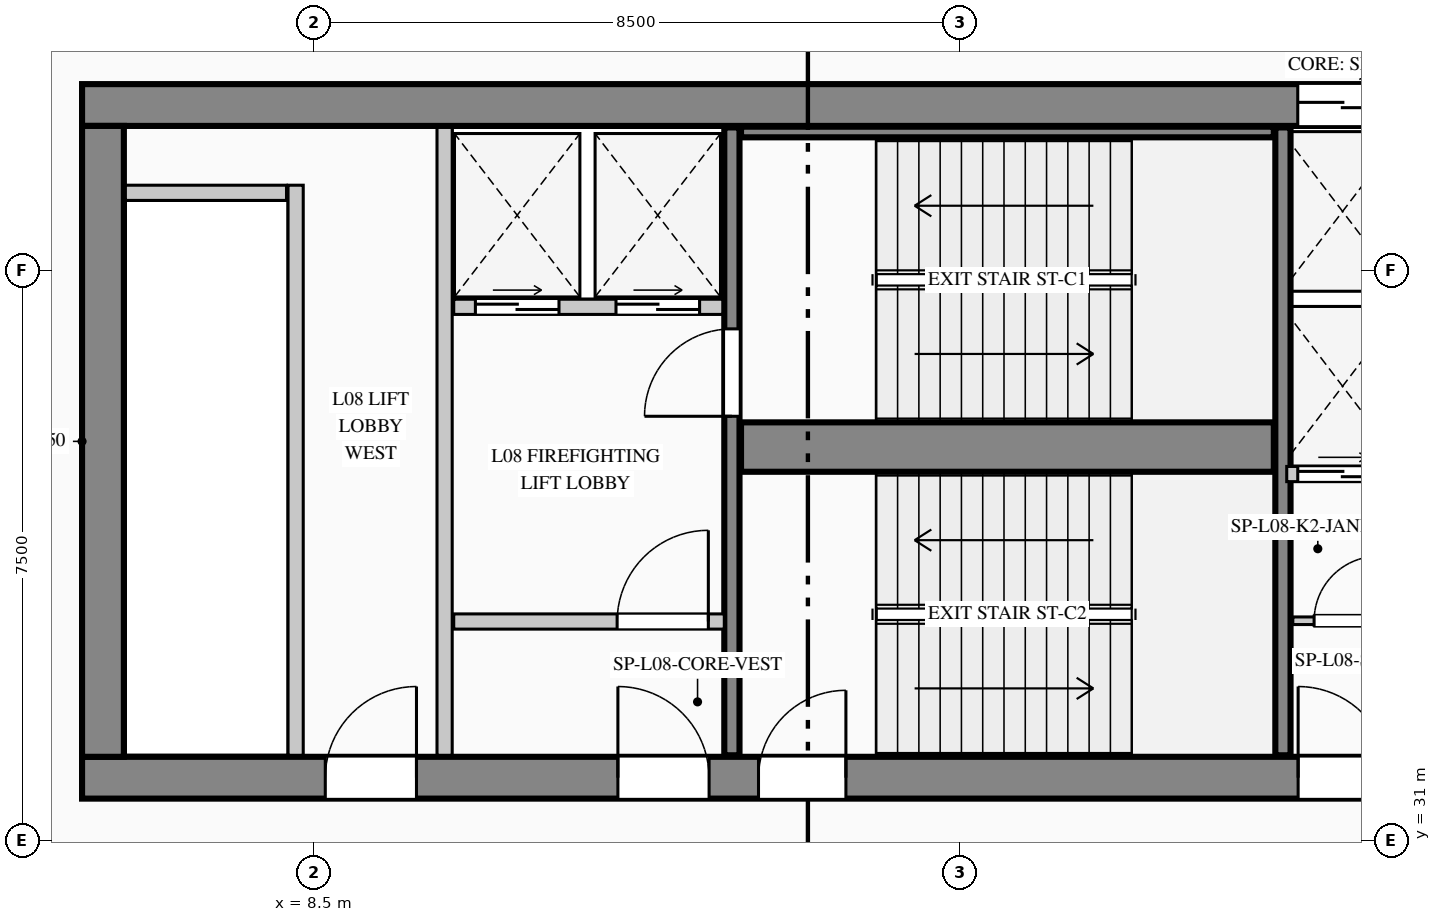
"""IFC4 building model, lengths in metres.
Left out: names, types, materials, properties, quantities, classifications, styles, units other than length and angle.
Written with IfcOpenShell. Run it as: python <this file> out.ifc"""

import sys

from ifc_helpers import new_model, si_unit, direction, frame, frame_2d, origin, place, context, subcontext, project, spatial, rectangle, extrude, element, fill, save


model = new_model("IFC4")
c1 = context("Model", 3, precision=1e-05, world=origin(), true_north=direction((0.0, 1.0)))
c2 = subcontext(c1, "Body", "Model", "MODEL_VIEW")
j1 = project(units=[si_unit("LENGTHUNIT", "METRE"), si_unit("PLANEANGLEUNIT", "RADIAN")], contexts=[c1])
p1 = place(None, origin())
s1 = spatial("IfcSite", under=j1, at=p1, CompositionType="ELEMENT")
p2 = place(p1, origin())
s2 = spatial("IfcBuilding", under=s1, at=p2, CompositionType="ELEMENT")
p3 = place(p2, frame((0.0, 0.0, 35.8)))
s3 = spatial("IfcBuildingStorey", under=s2, at=p3, CompositionType="ELEMENT", Elevation=35.8)
p4 = place(p3, frame((5.45, 40.675, 0.0), z_axis=(0.0, 0.0, 1.0), x_axis=(1.0, 0.0, 0.0)))
e1 = element("IfcWall", 1, at=p4, inside=s3, PredefinedType="SHEAR", context=c2, shape_type="SweptSolid", body=[
    extrude(rectangle(XDim=17.95, YDim=0.55, at=frame_2d((8.975, 0.0))), origin(), (0.0, 0.0, 1.0), 4.4),
])
p5 = place(p4, frame((15.995, 0.0, 0.0)))
e2 = element("IfcOpeningElement", 2, at=p5, cuts=e1, PredefinedType="OPENING", context=c2, shape_type="SweptSolid", body=[
    extrude(rectangle(XDim=1.18, YDim=2.25, at=frame_2d((0.59, 1.125))), frame((0.0, 0.285, 0.0), z_axis=(0.0, -1.0, 0.0), x_axis=(1.0, 0.0, 0.0)), (0.0, 0.0, 1.0), 0.57),
])
p6 = place(p3, frame((5.45, 31.825, 0.0), z_axis=(0.0, 0.0, 1.0), x_axis=(1.0, 0.0, 0.0)))
e3 = element("IfcWall", 3, at=p6, inside=s3, PredefinedType="SHEAR", context=c2, shape_type="SweptSolid", body=[
    extrude(rectangle(XDim=17.95, YDim=0.55, at=frame_2d((8.975, 0.0))), origin(), (0.0, 0.0, 1.0), 4.4),
])
p7 = place(p6, frame((3.2, 0.0, 0.0)))
e4 = element("IfcOpeningElement", 4, at=p7, cuts=e3, PredefinedType="OPENING", context=c2, shape_type="SweptSolid", body=[
    extrude(rectangle(XDim=1.2, YDim=2.2, at=frame_2d((0.6, 1.1))), frame((0.0, 0.285, 0.0), z_axis=(0.0, -1.0, 0.0), x_axis=(1.0, 0.0, 0.0)), (0.0, 0.0, 1.0), 0.57),
])
p8 = place(p6, frame((7.05, 0.0, 0.0)))
e5 = element("IfcOpeningElement", 5, at=p8, cuts=e3, PredefinedType="OPENING", context=c2, shape_type="SweptSolid", body=[
    extrude(rectangle(XDim=1.2, YDim=2.2, at=frame_2d((0.6, 1.1))), frame((0.0, 0.285, 0.0), z_axis=(0.0, -1.0, 0.0), x_axis=(1.0, 0.0, 0.0)), (0.0, 0.0, 1.0), 0.57),
])
p9 = place(p6, frame((8.9, 0.0, 0.0)))
e6 = element("IfcOpeningElement", 6, at=p9, cuts=e3, PredefinedType="OPENING", context=c2, shape_type="SweptSolid", body=[
    extrude(rectangle(XDim=1.15, YDim=2.2, at=frame_2d((0.575, 1.1))), frame((0.0, 0.285, 0.0), z_axis=(0.0, -1.0, 0.0), x_axis=(1.0, 0.0, 0.0)), (0.0, 0.0, 1.0), 0.57),
])
p10 = place(p6, frame((16.0, 0.0, 0.0)))
e7 = element("IfcOpeningElement", 7, at=p10, cuts=e3, PredefinedType="OPENING", context=c2, shape_type="SweptSolid", body=[
    extrude(rectangle(XDim=1.2, YDim=2.2, at=frame_2d((0.6, 1.1))), frame((0.0, 0.285, 0.0), z_axis=(0.0, -1.0, 0.0), x_axis=(1.0, 0.0, 0.0)), (0.0, 0.0, 1.0), 0.57),
])
p11 = place(p3, frame((5.725, 32.1, 0.0), z_axis=(0.0, 0.0, 1.0), x_axis=(0.0, 1.0, 0.0)))
e8 = element("IfcWall", 8, at=p11, inside=s3, PredefinedType="SHEAR", context=c2, shape_type="SweptSolid", body=[
    extrude(rectangle(XDim=8.3, YDim=0.55, at=frame_2d((4.15, 0.0))), origin(), (0.0, 0.0, 1.0), 4.4),
])
p12 = place(p3, frame((14.0, 32.12, 0.0), z_axis=(0.0, 0.0, 1.0), x_axis=(0.0, 1.0, 0.0)))
e9 = element("IfcWall", 9, at=p12, inside=s3, PredefinedType="SHEAR", context=c2, shape_type="SweptSolid", body=[
    extrude(rectangle(XDim=8.26, YDim=0.2, at=frame_2d((4.13, 0.0))), origin(), (0.0, 0.0, 1.0), 4.4),
])
p13 = place(p12, frame((4.46, 0.0, 0.0)))
e10 = element("IfcOpeningElement", 10, at=p13, cuts=e9, PredefinedType="OPENING", context=c2, shape_type="SweptSolid", body=[
    extrude(rectangle(XDim=1.15, YDim=2.2, at=frame_2d((0.575, 1.1))), frame((0.0, 0.11, 0.0), z_axis=(0.0, -1.0, 0.0), x_axis=(1.0, 0.0, 0.0)), (0.0, 0.0, 1.0), 0.22),
])
p14 = place(p3, frame((14.12, 36.175, 0.0), z_axis=(0.0, 0.0, 1.0), x_axis=(1.0, 0.0, 0.0)))
e11 = element("IfcWall", 11, at=p14, inside=s3, PredefinedType="SHEAR", context=c2, shape_type="SweptSolid", body=[
    extrude(rectangle(XDim=7.01, YDim=0.65, at=frame_2d((3.505, 0.0))), origin(), (0.0, 0.0, 1.0), 4.4),
])
p15 = place(p3, frame((21.25, 32.12, 0.0), z_axis=(0.0, 0.0, 1.0), x_axis=(0.0, 1.0, 0.0)))
e12 = element("IfcWall", 12, at=p15, inside=s3, PredefinedType="SHEAR", context=c2, shape_type="SweptSolid", body=[
    extrude(rectangle(XDim=8.26, YDim=0.2, at=frame_2d((4.13, 0.0))), origin(), (0.0, 0.0, 1.0), 4.4),
])
p16 = place(p3, frame((14.12, 40.32, 0.0), z_axis=(0.0, 0.0, 1.0), x_axis=(1.0, 0.0, 0.0)))
e13 = element("IfcWall", 13, at=p16, inside=s3, PredefinedType="SHEAR", context=c2, shape_type="SweptSolid", body=[
    extrude(rectangle(XDim=7.01, YDim=0.14, at=frame_2d((3.505, 0.0))), origin(), (0.0, 0.0, 1.0), 4.4),
])
p17 = place(p3, frame((8.523, 4.84, 0.0), z_axis=(0.0, 0.0, 1.0), x_axis=(-0.150394554312, 0.988626055712, 0.0)))
e14 = element("IfcWall", 14, at=p17, inside=s3, PredefinedType="STANDARD", context=c2, shape_type="SweptSolid", body=[
    extrude(rectangle(XDim=36.738, YDim=0.28, at=frame_2d((18.369, 0.0))), origin(), (0.0, 0.0, 1.0), 4.1),
])
p18 = place(p17, frame((22.762, 0.0, 0.9)))
e15 = element("IfcOpeningElement", 15, at=p18, cuts=e14, PredefinedType="OPENING", context=c2, shape_type="SweptSolid", body=[
    extrude(rectangle(XDim=1.5, YDim=1.8, at=frame_2d((0.75, 0.9))), frame((0.0, 0.15, 0.0), z_axis=(0.0, -1.0, 0.0), x_axis=(1.0, 0.0, 0.0)), (0.0, 0.0, 1.0), 0.3),
])
p19 = place(p3, frame((8.26, 32.12, 0.0), z_axis=(0.0, 0.0, 1.0), x_axis=(0.0, 1.0, 0.0)))
e16 = element("IfcWall", 16, at=p19, inside=s3, PredefinedType="PARTITIONING", context=c2, shape_type="SweptSolid", body=[
    extrude(rectangle(XDim=7.5, YDim=0.2, at=frame_2d((3.75, 0.0))), origin(), (0.0, 0.0, 1.0), 4.1),
])
p20 = place(p3, frame((6.02, 39.52, 0.0), z_axis=(0.0, 0.0, 1.0), x_axis=(1.0, 0.0, 0.0)))
e17 = element("IfcWall", 17, at=p20, inside=s3, PredefinedType="PARTITIONING", context=c2, shape_type="SweptSolid", body=[
    extrude(rectangle(XDim=2.12, YDim=0.2, at=frame_2d((1.06, 0.0))), origin(), (0.0, 0.0, 1.0), 4.1),
])
p21 = place(p3, frame((10.22, 32.12, 0.0), z_axis=(0.0, 0.0, 1.0), x_axis=(0.0, 1.0, 0.0)))
e18 = element("IfcWall", 18, at=p21, inside=s3, PredefinedType="PARTITIONING", context=c2, shape_type="SweptSolid", body=[
    extrude(rectangle(XDim=8.26, YDim=0.2, at=frame_2d((4.13, 0.0))), origin(), (0.0, 0.0, 1.0), 4.1),
])
p22 = place(p3, frame((10.34, 38.02, 0.0), z_axis=(0.0, 0.0, 1.0), x_axis=(1.0, 0.0, 0.0)))
e19 = element("IfcWall", 19, at=p22, inside=s3, PredefinedType="PARTITIONING", context=c2, shape_type="SweptSolid", body=[
    extrude(rectangle(XDim=3.54, YDim=0.2, at=frame_2d((1.77, 0.0))), origin(), (0.0, 0.0, 1.0), 4.1),
])
p23 = place(p22, frame((0.285, 0.0, 0.0)))
e20 = element("IfcOpeningElement", 20, at=p23, cuts=e19, PredefinedType="OPENING", context=c2, shape_type="SweptSolid", body=[
    extrude(rectangle(XDim=1.1, YDim=2.2, at=frame_2d((0.55, 1.1))), frame((0.0, 0.11, 0.0), z_axis=(0.0, -1.0, 0.0), x_axis=(1.0, 0.0, 0.0)), (0.0, 0.0, 1.0), 0.22),
])
p24 = place(p22, frame((2.135, 0.0, 0.0)))
e21 = element("IfcOpeningElement", 21, at=p24, cuts=e19, PredefinedType="OPENING", context=c2, shape_type="SweptSolid", body=[
    extrude(rectangle(XDim=1.1, YDim=2.2, at=frame_2d((0.55, 1.1))), frame((0.0, 0.11, 0.0), z_axis=(0.0, -1.0, 0.0), x_axis=(1.0, 0.0, 0.0)), (0.0, 0.0, 1.0), 0.22),
])
p25 = place(p3, frame((10.34, 33.88, 0.0), z_axis=(0.0, 0.0, 1.0), x_axis=(1.0, 0.0, 0.0)))
e22 = element("IfcWall", 22, at=p25, inside=s3, PredefinedType="PARTITIONING", context=c2, shape_type="SweptSolid", body=[
    extrude(rectangle(XDim=3.56, YDim=0.2, at=frame_2d((1.78, 0.0))), origin(), (0.0, 0.0, 1.0), 4.1),
])
p26 = place(p25, frame((2.15, 0.0, 0.0)))
e23 = element("IfcOpeningElement", 23, at=p26, cuts=e22, PredefinedType="OPENING", context=c2, shape_type="SweptSolid", body=[
    extrude(rectangle(XDim=1.2, YDim=2.2, at=frame_2d((0.6, 1.1))), frame((0.0, 0.11, 0.0), z_axis=(0.0, -1.0, 0.0), x_axis=(1.0, 0.0, 0.0)), (0.0, 0.0, 1.0), 0.22),
])
p27 = place(p3, frame((21.38, 33.89, 0.0), z_axis=(0.0, 0.0, 1.0), x_axis=(1.0, 0.0, 0.0)))
e24 = element("IfcWall", 24, at=p27, inside=s3, PredefinedType="PARTITIONING", context=c2, shape_type="SweptSolid", body=[
    extrude(rectangle(XDim=1.42, YDim=0.1, at=frame_2d((0.71, 0.0))), origin(), (0.0, 0.0, 1.0), 4.1),
])
p28 = place(p27, frame((0.28, 0.0, 0.0)))
e25 = element("IfcOpeningElement", 25, at=p28, cuts=e24, PredefinedType="OPENING", context=c2, shape_type="SweptSolid", body=[
    extrude(rectangle(XDim=0.85, YDim=2.1, at=frame_2d((0.425, 1.05))), frame((0.0, 0.06, 0.0), z_axis=(0.0, -1.0, 0.0), x_axis=(1.0, 0.0, 0.0)), (0.0, 0.0, 1.0), 0.12),
])
p29 = place(p3, frame((21.3, 35.82, 0.0), z_axis=(0.0, 0.0, 1.0), x_axis=(1.0, 0.0, 0.0)))
e26 = element("IfcWall", 26, at=p29, inside=s3, PredefinedType="PARTITIONING", context=c2, shape_type="SweptSolid", body=[
    extrude(rectangle(XDim=1.5, YDim=0.2, at=frame_2d((0.75, 0.0))), origin(), (0.0, 0.0, 1.0), 4.1),
])
p30 = place(p29, frame((0.145, 0.0, 0.0)))
e27 = element("IfcOpeningElement", 27, at=p30, cuts=e26, PredefinedType="OPENING", context=c2, shape_type="SweptSolid", body=[
    extrude(rectangle(XDim=1.18, YDim=2.25, at=frame_2d((0.59, 1.125))), frame((0.0, 0.11, 0.0), z_axis=(0.0, -1.0, 0.0), x_axis=(1.0, 0.0, 0.0)), (0.0, 0.0, 1.0), 0.22),
])
p31 = place(p7, origin())
e28 = element("IfcDoor", 28, at=p31, inside=s3, OperationType="SINGLE_SWING_RIGHT", PredefinedType="DOOR", context=c2, shape_type="SweptSolid", body=[
    extrude(rectangle(XDim=1.2, YDim=2.2, at=frame_2d((0.6, 1.1))), frame((0.0, 0.025, 0.0), z_axis=(0.0, -1.0, 0.0), x_axis=(1.0, 0.0, 0.0)), (0.0, 0.0, 1.0), 0.05),
])
fill(e4, e28)
p32 = place(p8, origin())
e29 = element("IfcDoor", 29, at=p32, inside=s3, OperationType="SINGLE_SWING_LEFT", PredefinedType="DOOR", context=c2, shape_type="SweptSolid", body=[
    extrude(rectangle(XDim=1.2, YDim=2.2, at=frame_2d((0.6, 1.1))), frame((0.0, 0.025, 0.0), z_axis=(0.0, -1.0, 0.0), x_axis=(1.0, 0.0, 0.0)), (0.0, 0.0, 1.0), 0.05),
])
fill(e5, e29)
p33 = place(p9, origin())
e30 = element("IfcDoor", 30, at=p33, inside=s3, OperationType="SINGLE_SWING_RIGHT", PredefinedType="DOOR", context=c2, shape_type="SweptSolid", body=[
    extrude(rectangle(XDim=1.15, YDim=2.2, at=frame_2d((0.575, 1.1))), frame((0.0, 0.025, 0.0), z_axis=(0.0, -1.0, 0.0), x_axis=(1.0, 0.0, 0.0)), (0.0, 0.0, 1.0), 0.05),
])
fill(e6, e30)
p34 = place(p10, origin())
e31 = element("IfcDoor", 31, at=p34, inside=s3, OperationType="SINGLE_SWING_LEFT", PredefinedType="DOOR", context=c2, shape_type="SweptSolid", body=[
    extrude(rectangle(XDim=1.2, YDim=2.2, at=frame_2d((0.6, 1.1))), frame((0.0, 0.025, 0.0), z_axis=(0.0, -1.0, 0.0), x_axis=(1.0, 0.0, 0.0)), (0.0, 0.0, 1.0), 0.05),
])
fill(e7, e31)
p35 = place(p26, origin())
e32 = element("IfcDoor", 32, at=p35, inside=s3, OperationType="SINGLE_SWING_RIGHT", PredefinedType="DOOR", context=c2, shape_type="SweptSolid", body=[
    extrude(rectangle(XDim=1.2, YDim=2.2, at=frame_2d((0.6, 1.1))), frame((0.0, 0.025, 0.0), z_axis=(0.0, -1.0, 0.0), x_axis=(1.0, 0.0, 0.0)), (0.0, 0.0, 1.0), 0.05),
])
fill(e23, e32)
p36 = place(p28, origin())
e33 = element("IfcDoor", 33, at=p36, inside=s3, OperationType="SINGLE_SWING_RIGHT", PredefinedType="DOOR", context=c2, shape_type="SweptSolid", body=[
    extrude(rectangle(XDim=0.85, YDim=2.1, at=frame_2d((0.425, 1.05))), frame((0.0, 0.025, 0.0), z_axis=(0.0, -1.0, 0.0), x_axis=(1.0, 0.0, 0.0)), (0.0, 0.0, 1.0), 0.05),
])
fill(e25, e33)
p37 = place(p13, origin())
e34 = element("IfcDoor", 34, at=p37, inside=s3, OperationType="SINGLE_SWING_LEFT", PredefinedType="DOOR", context=c2, shape_type="SweptSolid", body=[
    extrude(rectangle(XDim=1.15, YDim=2.2, at=frame_2d((0.575, 1.1))), frame((0.0, 0.025, 0.0), z_axis=(0.0, -1.0, 0.0), x_axis=(1.0, 0.0, 0.0)), (0.0, 0.0, 1.0), 0.05),
])
fill(e10, e34)
p38 = place(p23, origin())
e35 = element("IfcDoor", 35, at=p38, inside=s3, OperationType="DOUBLE_DOOR_SLIDING", PredefinedType="DOOR", context=c2, shape_type="SweptSolid", body=[
    extrude(rectangle(XDim=1.1, YDim=2.2, at=frame_2d((0.55, 1.1))), frame((0.0, 0.025, 0.0), z_axis=(0.0, -1.0, 0.0), x_axis=(1.0, 0.0, 0.0)), (0.0, 0.0, 1.0), 0.05),
])
fill(e20, e35)
p39 = place(p24, origin())
e36 = element("IfcDoor", 36, at=p39, inside=s3, OperationType="DOUBLE_DOOR_SLIDING", PredefinedType="DOOR", context=c2, shape_type="SweptSolid", body=[
    extrude(rectangle(XDim=1.1, YDim=2.2, at=frame_2d((0.55, 1.1))), frame((0.0, 0.025, 0.0), z_axis=(0.0, -1.0, 0.0), x_axis=(1.0, 0.0, 0.0)), (0.0, 0.0, 1.0), 0.05),
])
fill(e21, e36)
p40 = place(p5, origin())
e37 = element("IfcDoor", 37, at=p40, inside=s3, OperationType="DOUBLE_DOOR_SLIDING", PredefinedType="DOOR", context=c2, shape_type="SweptSolid", body=[
    extrude(rectangle(XDim=1.18, YDim=2.25, at=frame_2d((0.59, 1.125))), frame((0.0, 0.025, 0.0), z_axis=(0.0, -1.0, 0.0), x_axis=(1.0, 0.0, 0.0)), (0.0, 0.0, 1.0), 0.05),
])
fill(e2, e37)
p41 = place(p30, origin())
e38 = element("IfcDoor", 38, at=p41, inside=s3, OperationType="DOUBLE_DOOR_SLIDING", PredefinedType="DOOR", context=c2, shape_type="SweptSolid", body=[
    extrude(rectangle(XDim=1.18, YDim=2.25, at=frame_2d((0.59, 1.125))), frame((0.0, 0.025, 0.0), z_axis=(0.0, -1.0, 0.0), x_axis=(1.0, 0.0, 0.0)), (0.0, 0.0, 1.0), 0.05),
])
fill(e27, e38)
save(model, sys.argv[1])
